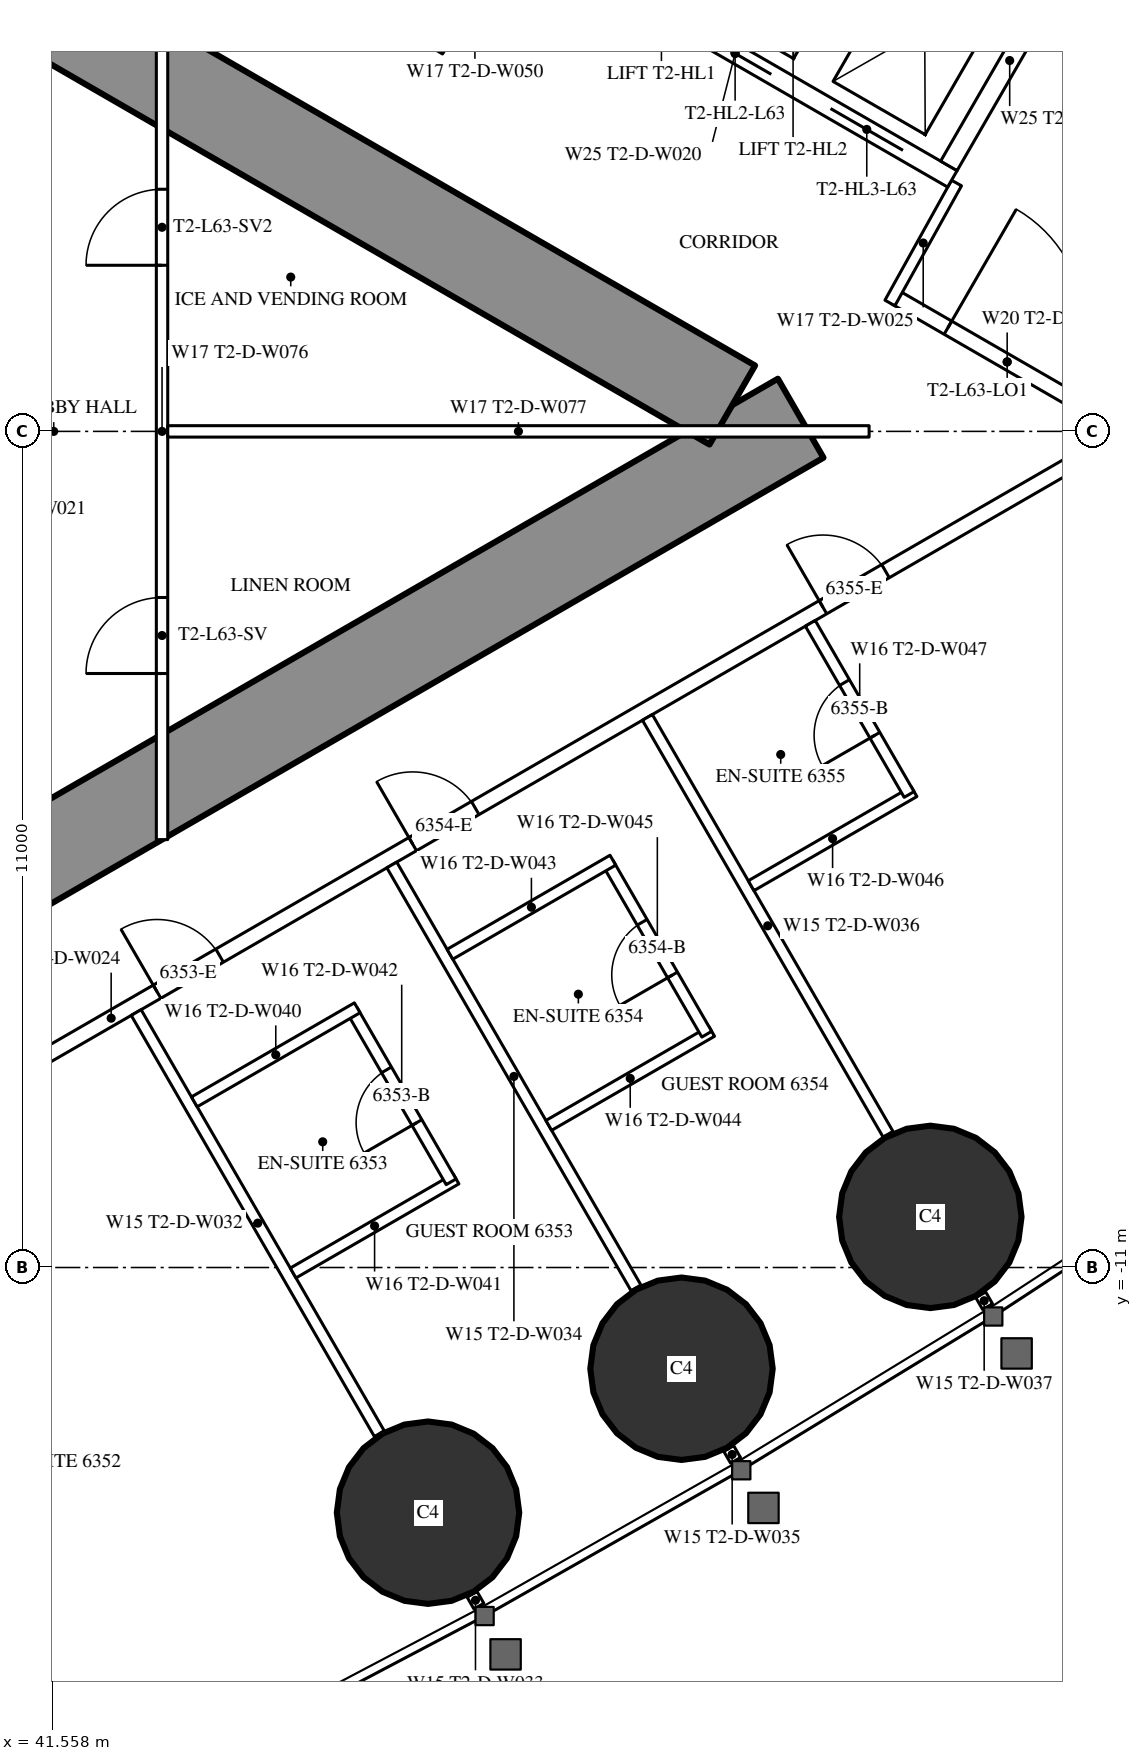
"""IFC4 building model, lengths in metres.
Left out: names, types, materials, properties, quantities, classifications, styles, units other than length and angle.
Written with IfcOpenShell. Run it as: python <this file> out.ifc"""

import sys

from ifc_helpers import new_model, si_unit, direction, frame, frame_2d, origin, origin_2d, place, context, subcontext, project, spatial, rectangle, circle, extrude, element, fill, save


model = new_model("IFC4")
c1 = context("Model", 3, precision=1e-05, world=origin(), true_north=direction((0.0, 1.0)))
c2 = subcontext(c1, "Body", "Model", "MODEL_VIEW")
j1 = project(units=[si_unit("LENGTHUNIT", "METRE"), si_unit("PLANEANGLEUNIT", "RADIAN")], contexts=[c1])
p1 = place(None, origin())
s1 = spatial("IfcSite", under=j1, at=p1, CompositionType="ELEMENT")
p2 = place(p1, origin())
s2 = spatial("IfcBuilding", under=s1, at=p2, CompositionType="ELEMENT")
p3 = place(p2, frame((0.0, 0.0, 236.9)))
s3 = spatial("IfcBuildingStorey", under=s2, at=p3, CompositionType="ELEMENT", Elevation=236.9)
for number, where, z_axis, x_axis in (
    (1, (46.499, -14.226, 0.0), (0.0, 0.0, 1.0), (1.0, 0.0, 0.0)),
    (2, (49.834, -12.332, 0.0), (0.0, 0.0, 1.0), (1.0, 0.0, 0.0)),
    (3, (53.108, -10.334, 0.0), (0.0, 0.0, 1.0), (1.0, 0.0, 0.0)),
):
    element("IfcColumn", number, at=place(p3, frame(where, z_axis=z_axis, x_axis=x_axis)), inside=s3, PredefinedType="COLUMN", context=c2, shape_type="SweptSolid", body=[
        extrude(circle(Radius=1.2, at=origin_2d()), origin(), (0.0, 0.0, 1.0), 3.6),
    ])
p4 = place(p3, frame((27.2, -13.8, 0.0), z_axis=(0.0, 0.0, 1.0), x_axis=(0.866027159892, 0.499996958321, 0.0)))
e4 = element("IfcWall", 4, at=p4, inside=s3, PredefinedType="SHEAR", context=c2, shape_type="SweptSolid", body=[
    extrude(rectangle(XDim=27.947, YDim=1.2, at=frame_2d((13.973, 0.0))), origin(), (0.0, 0.0, 1.0), 3.6),
])
p5 = place(p4, frame((4.6, 0.0, 0.0)))
e5 = element("IfcOpeningElement", 5, at=p5, cuts=e4, PredefinedType="OPENING", context=c2, shape_type="SweptSolid", body=[
    extrude(rectangle(XDim=1.0, YDim=2.2, at=frame_2d((0.5, 1.1))), frame((0.0, 0.61, 0.0), z_axis=(0.0, -1.0, 0.0), x_axis=(1.0, 0.0, 0.0)), (0.0, 0.0, 1.0), 1.22),
])
p6 = place(p4, frame((13.395, 0.0, 0.0)))
e6 = element("IfcOpeningElement", 6, at=p6, cuts=e4, PredefinedType="OPENING", context=c2, shape_type="SweptSolid", body=[
    extrude(rectangle(XDim=1.8, YDim=2.2, at=frame_2d((0.9, 1.1))), frame((0.0, 0.61, 0.0), z_axis=(0.0, -1.0, 0.0), x_axis=(1.0, 0.0, 0.0)), (0.0, 0.0, 1.0), 1.22),
])
p7 = place(p3, frame((27.2, 13.8, 0.0), z_axis=(0.0, 0.0, 1.0), x_axis=(0.866024515034, -0.500001539357, 0.0)))
e7 = element("IfcWall", 7, at=p7, inside=s3, PredefinedType="SHEAR", context=c2, shape_type="SweptSolid", body=[
    extrude(rectangle(XDim=26.907, YDim=1.2, at=frame_2d((13.454, 0.0))), origin(), (0.0, 0.0, 1.0), 3.6),
])
p8 = place(p7, frame((4.6, 0.0, 0.0)))
e8 = element("IfcOpeningElement", 8, at=p8, cuts=e7, PredefinedType="OPENING", context=c2, shape_type="SweptSolid", body=[
    extrude(rectangle(XDim=1.0, YDim=2.2, at=frame_2d((0.5, 1.1))), frame((0.0, 0.61, 0.0), z_axis=(0.0, -1.0, 0.0), x_axis=(1.0, 0.0, 0.0)), (0.0, 0.0, 1.0), 1.22),
])
p9 = place(p7, frame((13.395, 0.0, 0.0)))
e9 = element("IfcOpeningElement", 9, at=p9, cuts=e7, PredefinedType="OPENING", context=c2, shape_type="SweptSolid", body=[
    extrude(rectangle(XDim=1.8, YDim=2.2, at=frame_2d((0.9, 1.1))), frame((0.0, 0.61, 0.0), z_axis=(0.0, -1.0, 0.0), x_axis=(1.0, 0.0, 0.0)), (0.0, 0.0, 1.0), 1.22),
])
p10 = place(p3, frame((28.959, -15.44, 0.0), z_axis=(0.0, 0.0, 1.0), x_axis=(0.866025227435, 0.500000305447, 0.0)))
e10 = element("IfcWall", 10, at=p10, inside=s3, PredefinedType="PARTITIONING", context=c2, shape_type="SweptSolid", body=[
    extrude(rectangle(XDim=30.88, YDim=0.2, at=frame_2d((15.44, 0.0))), origin(), (0.0, 0.0, 1.0), 3.35),
])
p11 = place(p10, frame((1.494, 0.0, 0.0)))
e11 = element("IfcOpeningElement", 11, at=p11, cuts=e10, PredefinedType="OPENING", context=c2, shape_type="SweptSolid", body=[
    extrude(rectangle(XDim=1.8, YDim=2.03, at=frame_2d((0.9, 1.015))), frame((0.0, 0.11, 0.0), z_axis=(0.0, -1.0, 0.0), x_axis=(1.0, 0.0, 0.0)), (0.0, 0.0, 1.0), 0.22),
])
p12 = place(p10, frame((7.687, 0.0, 0.0)))
e12 = element("IfcOpeningElement", 12, at=p12, cuts=e10, PredefinedType="OPENING", context=c2, shape_type="SweptSolid", body=[
    extrude(rectangle(XDim=1.0, YDim=2.2, at=frame_2d((0.5, 1.1))), frame((0.0, 0.11, 0.0), z_axis=(0.0, -1.0, 0.0), x_axis=(1.0, 0.0, 0.0)), (0.0, 0.0, 1.0), 0.22),
])
p13 = place(p10, frame((16.137, 0.0, 0.0)))
e13 = element("IfcOpeningElement", 13, at=p13, cuts=e10, PredefinedType="OPENING", context=c2, shape_type="SweptSolid", body=[
    extrude(rectangle(XDim=0.95, YDim=2.2, at=frame_2d((0.475, 1.1))), frame((0.0, 0.11, 0.0), z_axis=(0.0, -1.0, 0.0), x_axis=(1.0, 0.0, 0.0)), (0.0, 0.0, 1.0), 0.22),
])
p14 = place(p10, frame((20.021, 0.0, 0.0)))
e14 = element("IfcOpeningElement", 14, at=p14, cuts=e10, PredefinedType="OPENING", context=c2, shape_type="SweptSolid", body=[
    extrude(rectangle(XDim=0.95, YDim=2.2, at=frame_2d((0.475, 1.1))), frame((0.0, 0.11, 0.0), z_axis=(0.0, -1.0, 0.0), x_axis=(1.0, 0.0, 0.0)), (0.0, 0.0, 1.0), 0.22),
])
p15 = place(p10, frame((26.253, 0.0, 0.0)))
e15 = element("IfcOpeningElement", 15, at=p15, cuts=e10, PredefinedType="OPENING", context=c2, shape_type="SweptSolid", body=[
    extrude(rectangle(XDim=0.95, YDim=2.2, at=frame_2d((0.475, 1.1))), frame((0.0, 0.11, 0.0), z_axis=(0.0, -1.0, 0.0), x_axis=(1.0, 0.0, 0.0)), (0.0, 0.0, 1.0), 0.22),
])
p16 = place(p3, frame((42.66, -7.646, 0.0), z_axis=(0.0, 0.0, 1.0), x_axis=(0.499996592859, -0.866027370889, 0.0)))
e16 = element("IfcWall", 16, at=p16, inside=s3, PredefinedType="PARTITIONING", context=c2, shape_type="SweptSolid", body=[
    extrude(rectangle(XDim=6.398, YDim=0.15, at=frame_2d((3.199, 0.0))), origin(), (0.0, 0.0, 1.0), 2.45),
])
p17 = place(p3, frame((47.079, -15.3, 0.0), z_axis=(0.0, 0.0, 1.0), x_axis=(0.499212083968, -0.866479829667, 0.0)))
e17 = element("IfcWall", 17, at=p17, inside=s3, PredefinedType="PARTITIONING", context=c2, shape_type="SweptSolid", body=[
    extrude(rectangle(XDim=0.179, YDim=0.15, at=frame_2d((0.09, 0.0))), origin(), (0.0, 0.0, 1.0), 2.45),
])
p18 = place(p3, frame((46.023, -5.704, 0.0), z_axis=(0.0, 0.0, 1.0), x_axis=(0.499984478165, -0.866034365135, 0.0)))
e18 = element("IfcWall", 18, at=p18, inside=s3, PredefinedType="PARTITIONING", context=c2, shape_type="SweptSolid", body=[
    extrude(rectangle(XDim=6.426, YDim=0.15, at=frame_2d((3.213, 0.0))), origin(), (0.0, 0.0, 1.0), 2.45),
])
p19 = place(p3, frame((50.456, -13.382, 0.0), z_axis=(0.0, 0.0, 1.0), x_axis=(0.500661834965, -0.865642955848, 0.0)))
e19 = element("IfcWall", 19, at=p19, inside=s3, PredefinedType="PARTITIONING", context=c2, shape_type="SweptSolid", body=[
    extrude(rectangle(XDim=0.18, YDim=0.15, at=frame_2d((0.09, 0.0))), origin(), (0.0, 0.0, 1.0), 2.45),
])
p20 = place(p3, frame((49.385, -3.763, 0.0), z_axis=(0.0, 0.0, 1.0), x_axis=(0.499999447814, -0.866025722589, 0.0)))
e20 = element("IfcWall", 20, at=p20, inside=s3, PredefinedType="PARTITIONING", context=c2, shape_type="SweptSolid", body=[
    extrude(rectangle(XDim=6.333, YDim=0.15, at=frame_2d((3.166, 0.0))), origin(), (0.0, 0.0, 1.0), 2.45),
])
p21 = place(p3, frame((53.771, -11.36, 0.0), z_axis=(0.0, 0.0, 1.0), x_axis=(0.499524978789, -0.866299483762, 0.0)))
e21 = element("IfcWall", 21, at=p21, inside=s3, PredefinedType="PARTITIONING", context=c2, shape_type="SweptSolid", body=[
    extrude(rectangle(XDim=0.178, YDim=0.15, at=frame_2d((0.089, 0.0))), origin(), (0.0, 0.0, 1.0), 2.45),
])
p22 = place(p3, frame((52.639, 1.769, 0.0), z_axis=(0.0, 0.0, 1.0), x_axis=(0.866027340901, -0.4999966448, 0.0)))
e22 = element("IfcWall", 22, at=p22, inside=s3, PredefinedType="PARTITIONING", context=c2, shape_type="SweptSolid", body=[
    extrude(rectangle(XDim=3.417, YDim=0.2, at=frame_2d((1.708, 0.0))), origin(), (0.0, 0.0, 1.0), 3.35),
])
p23 = place(p22, frame((0.809, 0.0, 0.0)))
e23 = element("IfcOpeningElement", 23, at=p23, cuts=e22, PredefinedType="OPENING", context=c2, shape_type="SweptSolid", body=[
    extrude(rectangle(XDim=1.8, YDim=2.2, at=frame_2d((0.9, 1.1))), frame((0.0, 0.11, 0.0), z_axis=(0.0, -1.0, 0.0), x_axis=(1.0, 0.0, 0.0)), (0.0, 0.0, 1.0), 0.22),
])
p24 = place(p3, frame((47.606, 6.642, 0.0), z_axis=(0.0, 0.0, 1.0), x_axis=(-0.51353662755, -0.858067673418, 0.0)))
e24 = element("IfcWall", 24, at=p24, inside=s3, PredefinedType="PARTITIONING", context=c2, shape_type="SweptSolid", body=[
    extrude(rectangle(XDim=1.91, YDim=0.15, at=frame_2d((0.955, 0.0))), origin(), (0.0, 0.0, 1.0), 3.35),
])
p25 = place(p3, frame((52.576, 1.689, 0.0), z_axis=(0.0, 0.0, 1.0), x_axis=(0.485424724123, 0.874278466629, 0.0)))
e25 = element("IfcWall", 25, at=p25, inside=s3, PredefinedType="PARTITIONING", context=c2, shape_type="SweptSolid", body=[
    extrude(rectangle(XDim=1.805, YDim=0.15, at=frame_2d((0.903, 0.0))), origin(), (0.0, 0.0, 1.0), 3.35),
])
p26 = place(p3, frame((44.725, -11.072, 0.0), z_axis=(0.0, 0.0, 1.0), x_axis=(0.866006523861, 0.500032699561, 0.0)))
e26 = element("IfcWall", 26, at=p26, inside=s3, PredefinedType="PARTITIONING", context=c2, shape_type="SweptSolid", body=[
    extrude(rectangle(XDim=2.475, YDim=0.15, at=frame_2d((1.237, 0.0))), origin(), (0.0, 0.0, 1.0), 3.35),
])
p27 = place(p3, frame((45.503, -7.621, 0.0), z_axis=(0.0, 0.0, 1.0), x_axis=(0.500006934395, -0.866021400173, 0.0)))
e27 = element("IfcWall", 27, at=p27, inside=s3, PredefinedType="PARTITIONING", context=c2, shape_type="SweptSolid", body=[
    extrude(rectangle(XDim=2.6, YDim=0.15, at=frame_2d((1.3, 0.0))), origin(), (0.0, 0.0, 1.0), 3.35),
])
p28 = place(p27, frame((0.9, 0.0, 0.0)))
e28 = element("IfcOpeningElement", 28, at=p28, cuts=e27, PredefinedType="OPENING", context=c2, shape_type="SweptSolid", body=[
    extrude(rectangle(XDim=0.8, YDim=2.2, at=frame_2d((0.4, 1.1))), frame((0.0, 0.085, 0.0), z_axis=(0.0, -1.0, 0.0), x_axis=(1.0, 0.0, 0.0)), (0.0, 0.0, 1.0), 0.17),
])
for number, where, z_axis, x_axis in (
    (29, (43.425, -8.821, 0.0), (0.0, 0.0, 1.0), (0.866, 0.5, 0.0)),
    (30, (48.088, -9.13, 0.0), (0.0, 0.0, 1.0), (0.866, 0.5, 0.0)),
):
    element("IfcWall", number, at=place(p3, frame(where, z_axis=z_axis, x_axis=x_axis)), inside=s3, PredefinedType="PARTITIONING", context=c2, shape_type="SweptSolid", body=[
        extrude(rectangle(XDim=2.475, YDim=0.15, at=frame_2d((1.237, 0.0))), origin(), (0.0, 0.0, 1.0), 3.35),
    ])
p29 = place(p3, frame((48.866, -5.679, 0.0), z_axis=(0.0, 0.0, 1.0), x_axis=(0.500006934395, -0.866021400173, 0.0)))
e31 = element("IfcWall", 31, at=p29, inside=s3, PredefinedType="PARTITIONING", context=c2, shape_type="SweptSolid", body=[
    extrude(rectangle(XDim=2.6, YDim=0.15, at=frame_2d((1.3, 0.0))), origin(), (0.0, 0.0, 1.0), 3.35),
])
p30 = place(p29, frame((0.9, 0.0, 0.0)))
e32 = element("IfcOpeningElement", 32, at=p30, cuts=e31, PredefinedType="OPENING", context=c2, shape_type="SweptSolid", body=[
    extrude(rectangle(XDim=0.8, YDim=2.2, at=frame_2d((0.4, 1.1))), frame((0.0, 0.085, 0.0), z_axis=(0.0, -1.0, 0.0), x_axis=(1.0, 0.0, 0.0)), (0.0, 0.0, 1.0), 0.17),
])
p31 = place(p3, frame((46.788, -6.879, 0.0), z_axis=(0.0, 0.0, 1.0), x_axis=(0.866006523861, 0.500032699561, 0.0)))
e33 = element("IfcWall", 33, at=p31, inside=s3, PredefinedType="PARTITIONING", context=c2, shape_type="SweptSolid", body=[
    extrude(rectangle(XDim=2.475, YDim=0.15, at=frame_2d((1.237, 0.0))), origin(), (0.0, 0.0, 1.0), 3.35),
])
p32 = place(p3, frame((50.75, -5.977, 0.0), z_axis=(0.0, 0.0, 1.0), x_axis=(0.866031185235, 0.4999899861, 0.0)))
e34 = element("IfcWall", 34, at=p32, inside=s3, PredefinedType="PARTITIONING", context=c2, shape_type="SweptSolid", body=[
    extrude(rectangle(XDim=2.475, YDim=0.15, at=frame_2d((1.238, 0.0))), origin(), (0.0, 0.0, 1.0), 3.35),
])
p33 = place(p3, frame((51.529, -2.525, 0.0), z_axis=(0.0, 0.0, 1.0), x_axis=(0.500006934395, -0.866021400173, 0.0)))
e35 = element("IfcWall", 35, at=p33, inside=s3, PredefinedType="PARTITIONING", context=c2, shape_type="SweptSolid", body=[
    extrude(rectangle(XDim=2.6, YDim=0.15, at=frame_2d((1.3, 0.0))), origin(), (0.0, 0.0, 1.0), 3.35),
])
p34 = place(p33, frame((0.9, 0.0, 0.0)))
e36 = element("IfcOpeningElement", 36, at=p34, cuts=e35, PredefinedType="OPENING", context=c2, shape_type="SweptSolid", body=[
    extrude(rectangle(XDim=0.8, YDim=2.2, at=frame_2d((0.4, 1.1))), frame((0.0, 0.085, 0.0), z_axis=(0.0, -1.0, 0.0), x_axis=(1.0, 0.0, 0.0)), (0.0, 0.0, 1.0), 0.17),
])
p35 = place(p3, frame((43.0, -5.371, 0.0), z_axis=(0.0, 0.0, 1.0), x_axis=(0.0, 1.0, 0.0)))
e37 = element("IfcWall", 37, at=p35, inside=s3, PredefinedType="PARTITIONING", context=c2, shape_type="SweptSolid", body=[
    extrude(rectangle(XDim=10.741, YDim=0.15, at=frame_2d((5.371, 0.0))), origin(), (0.0, 0.0, 1.0), 3.35),
])
p36 = place(p35, frame((2.185, 0.0, 0.0)))
e38 = element("IfcOpeningElement", 38, at=p36, cuts=e37, PredefinedType="OPENING", context=c2, shape_type="SweptSolid", body=[
    extrude(rectangle(XDim=1.0, YDim=2.2, at=frame_2d((0.5, 1.1))), frame((0.0, 0.085, 0.0), z_axis=(0.0, -1.0, 0.0), x_axis=(1.0, 0.0, 0.0)), (0.0, 0.0, 1.0), 0.17),
])
p37 = place(p35, frame((7.556, 0.0, 0.0)))
e39 = element("IfcOpeningElement", 39, at=p37, cuts=e37, PredefinedType="OPENING", context=c2, shape_type="SweptSolid", body=[
    extrude(rectangle(XDim=1.0, YDim=2.2, at=frame_2d((0.5, 1.1))), frame((0.0, 0.085, 0.0), z_axis=(0.0, -1.0, 0.0), x_axis=(1.0, 0.0, 0.0)), (0.0, 0.0, 1.0), 0.17),
])
p38 = place(p3, frame((43.075, 0.0, 0.0), z_axis=(0.0, 0.0, 1.0), x_axis=(1.0, 0.0, 0.0)))
e40 = element("IfcWall", 40, at=p38, inside=s3, PredefinedType="PARTITIONING", context=c2, shape_type="SweptSolid", body=[
    extrude(rectangle(XDim=9.227, YDim=0.15, at=frame_2d((4.614, 0.0))), origin(), (0.0, 0.0, 1.0), 2.45),
])
p39 = place(p3, frame((47.681, 6.622, 0.0), z_axis=(0.0, 0.0, 1.0), x_axis=(0.86603344179, -0.499986077507, 0.0)))
e41 = element("IfcWall", 41, at=p39, inside=s3, PredefinedType="PARTITIONING", context=c2, shape_type="SweptSolid", body=[
    extrude(rectangle(XDim=6.6, YDim=0.25, at=frame_2d((3.3, 0.0))), origin(), (0.0, 0.0, 1.0), 3.35),
])
p40 = place(p39, frame((0.75, 0.0, 0.0)))
e42 = element("IfcOpeningElement", 42, at=p40, cuts=e41, PredefinedType="OPENING", context=c2, shape_type="SweptSolid", body=[
    extrude(rectangle(XDim=1.1, YDim=2.2, at=frame_2d((0.55, 1.1))), frame((0.0, 0.135, 0.0), z_axis=(0.0, -1.0, 0.0), x_axis=(1.0, 0.0, 0.0)), (0.0, 0.0, 1.0), 0.27),
])
p41 = place(p39, frame((2.75, 0.0, 0.0)))
e43 = element("IfcOpeningElement", 43, at=p41, cuts=e41, PredefinedType="OPENING", context=c2, shape_type="SweptSolid", body=[
    extrude(rectangle(XDim=1.1, YDim=2.2, at=frame_2d((0.55, 1.1))), frame((0.0, 0.135, 0.0), z_axis=(0.0, -1.0, 0.0), x_axis=(1.0, 0.0, 0.0)), (0.0, 0.0, 1.0), 0.27),
])
p42 = place(p39, frame((4.75, 0.0, 0.0)))
e44 = element("IfcOpeningElement", 44, at=p42, cuts=e41, PredefinedType="OPENING", context=c2, shape_type="SweptSolid", body=[
    extrude(rectangle(XDim=1.1, YDim=2.2, at=frame_2d((0.55, 1.1))), frame((0.0, 0.135, 0.0), z_axis=(0.0, -1.0, 0.0), x_axis=(1.0, 0.0, 0.0)), (0.0, 0.0, 1.0), 0.27),
])
p43 = place(p3, frame((53.352, 3.493, 0.0), z_axis=(0.0, 0.0, 1.0), x_axis=(0.499872130319, 0.866099216793, 0.0)))
e45 = element("IfcWall", 45, at=p43, inside=s3, PredefinedType="PARTITIONING", context=c2, shape_type="SweptSolid", body=[
    extrude(rectangle(XDim=3.2, YDim=0.25, at=frame_2d((1.6, 0.0))), origin(), (0.0, 0.0, 1.0), 3.35),
])
p44 = place(p28, origin())
e46 = element("IfcDoor", 46, at=p44, inside=s3, OperationType="SINGLE_SWING_RIGHT", PredefinedType="DOOR", context=c2, shape_type="SweptSolid", body=[
    extrude(rectangle(XDim=0.8, YDim=2.2, at=frame_2d((0.4, 1.1))), frame((0.0, 0.025, 0.0), z_axis=(0.0, -1.0, 0.0), x_axis=(1.0, 0.0, 0.0)), (0.0, 0.0, 1.0), 0.05),
])
fill(e28, e46)
p45 = place(p13, origin())
e47 = element("IfcDoor", 47, at=p45, inside=s3, OperationType="SINGLE_SWING_LEFT", PredefinedType="DOOR", context=c2, shape_type="SweptSolid", body=[
    extrude(rectangle(XDim=0.95, YDim=2.2, at=frame_2d((0.475, 1.1))), frame((0.0, 0.025, 0.0), z_axis=(0.0, -1.0, 0.0), x_axis=(1.0, 0.0, 0.0)), (0.0, 0.0, 1.0), 0.05),
])
fill(e13, e47)
p46 = place(p30, origin())
e48 = element("IfcDoor", 48, at=p46, inside=s3, OperationType="SINGLE_SWING_RIGHT", PredefinedType="DOOR", context=c2, shape_type="SweptSolid", body=[
    extrude(rectangle(XDim=0.8, YDim=2.2, at=frame_2d((0.4, 1.1))), frame((0.0, 0.025, 0.0), z_axis=(0.0, -1.0, 0.0), x_axis=(1.0, 0.0, 0.0)), (0.0, 0.0, 1.0), 0.05),
])
fill(e32, e48)
p47 = place(p14, origin())
e49 = element("IfcDoor", 49, at=p47, inside=s3, OperationType="SINGLE_SWING_LEFT", PredefinedType="DOOR", context=c2, shape_type="SweptSolid", body=[
    extrude(rectangle(XDim=0.95, YDim=2.2, at=frame_2d((0.475, 1.1))), frame((0.0, 0.025, 0.0), z_axis=(0.0, -1.0, 0.0), x_axis=(1.0, 0.0, 0.0)), (0.0, 0.0, 1.0), 0.05),
])
fill(e14, e49)
p48 = place(p34, origin())
e50 = element("IfcDoor", 50, at=p48, inside=s3, OperationType="SINGLE_SWING_RIGHT", PredefinedType="DOOR", context=c2, shape_type="SweptSolid", body=[
    extrude(rectangle(XDim=0.8, YDim=2.2, at=frame_2d((0.4, 1.1))), frame((0.0, 0.025, 0.0), z_axis=(0.0, -1.0, 0.0), x_axis=(1.0, 0.0, 0.0)), (0.0, 0.0, 1.0), 0.05),
])
fill(e36, e50)
p49 = place(p15, origin())
e51 = element("IfcDoor", 51, at=p49, inside=s3, OperationType="SINGLE_SWING_LEFT", PredefinedType="DOOR", context=c2, shape_type="SweptSolid", body=[
    extrude(rectangle(XDim=0.95, YDim=2.2, at=frame_2d((0.475, 1.1))), frame((0.0, 0.025, 0.0), z_axis=(0.0, -1.0, 0.0), x_axis=(1.0, 0.0, 0.0)), (0.0, 0.0, 1.0), 0.05),
])
fill(e15, e51)
p50 = place(p23, origin())
e52 = element("IfcDoor", 52, at=p50, inside=s3, OperationType="DOUBLE_DOOR_SINGLE_SWING", PredefinedType="DOOR", context=c2, shape_type="SweptSolid", body=[
    extrude(rectangle(XDim=1.8, YDim=2.2, at=frame_2d((0.9, 1.1))), frame((0.0, 0.025, 0.0), z_axis=(0.0, -1.0, 0.0), x_axis=(1.0, 0.0, 0.0)), (0.0, 0.0, 1.0), 0.05),
])
fill(e23, e52)
p51 = place(p36, origin())
e53 = element("IfcDoor", 53, at=p51, inside=s3, OperationType="SINGLE_SWING_LEFT", PredefinedType="DOOR", context=c2, shape_type="SweptSolid", body=[
    extrude(rectangle(XDim=1.0, YDim=2.2, at=frame_2d((0.5, 1.1))), frame((0.0, 0.025, 0.0), z_axis=(0.0, -1.0, 0.0), x_axis=(1.0, 0.0, 0.0)), (0.0, 0.0, 1.0), 0.05),
])
fill(e38, e53)
p52 = place(p37, origin())
e54 = element("IfcDoor", 54, at=p52, inside=s3, OperationType="SINGLE_SWING_LEFT", PredefinedType="DOOR", context=c2, shape_type="SweptSolid", body=[
    extrude(rectangle(XDim=1.0, YDim=2.2, at=frame_2d((0.5, 1.1))), frame((0.0, 0.025, 0.0), z_axis=(0.0, -1.0, 0.0), x_axis=(1.0, 0.0, 0.0)), (0.0, 0.0, 1.0), 0.05),
])
fill(e39, e54)
p53 = place(p41, origin())
e55 = element("IfcDoor", 55, at=p53, inside=s3, OperationType="DOUBLE_DOOR_SLIDING", PredefinedType="USERDEFINED", context=c2, shape_type="SweptSolid", body=[
    extrude(rectangle(XDim=1.1, YDim=2.2, at=frame_2d((0.55, 1.1))), frame((0.0, 0.025, 0.0), z_axis=(0.0, -1.0, 0.0), x_axis=(1.0, 0.0, 0.0)), (0.0, 0.0, 1.0), 0.05),
])
fill(e43, e55)
p54 = place(p42, origin())
e56 = element("IfcDoor", 56, at=p54, inside=s3, OperationType="DOUBLE_DOOR_SLIDING", PredefinedType="USERDEFINED", context=c2, shape_type="SweptSolid", body=[
    extrude(rectangle(XDim=1.1, YDim=2.2, at=frame_2d((0.55, 1.1))), frame((0.0, 0.025, 0.0), z_axis=(0.0, -1.0, 0.0), x_axis=(1.0, 0.0, 0.0)), (0.0, 0.0, 1.0), 0.05),
])
fill(e44, e56)
save(model, sys.argv[1])
